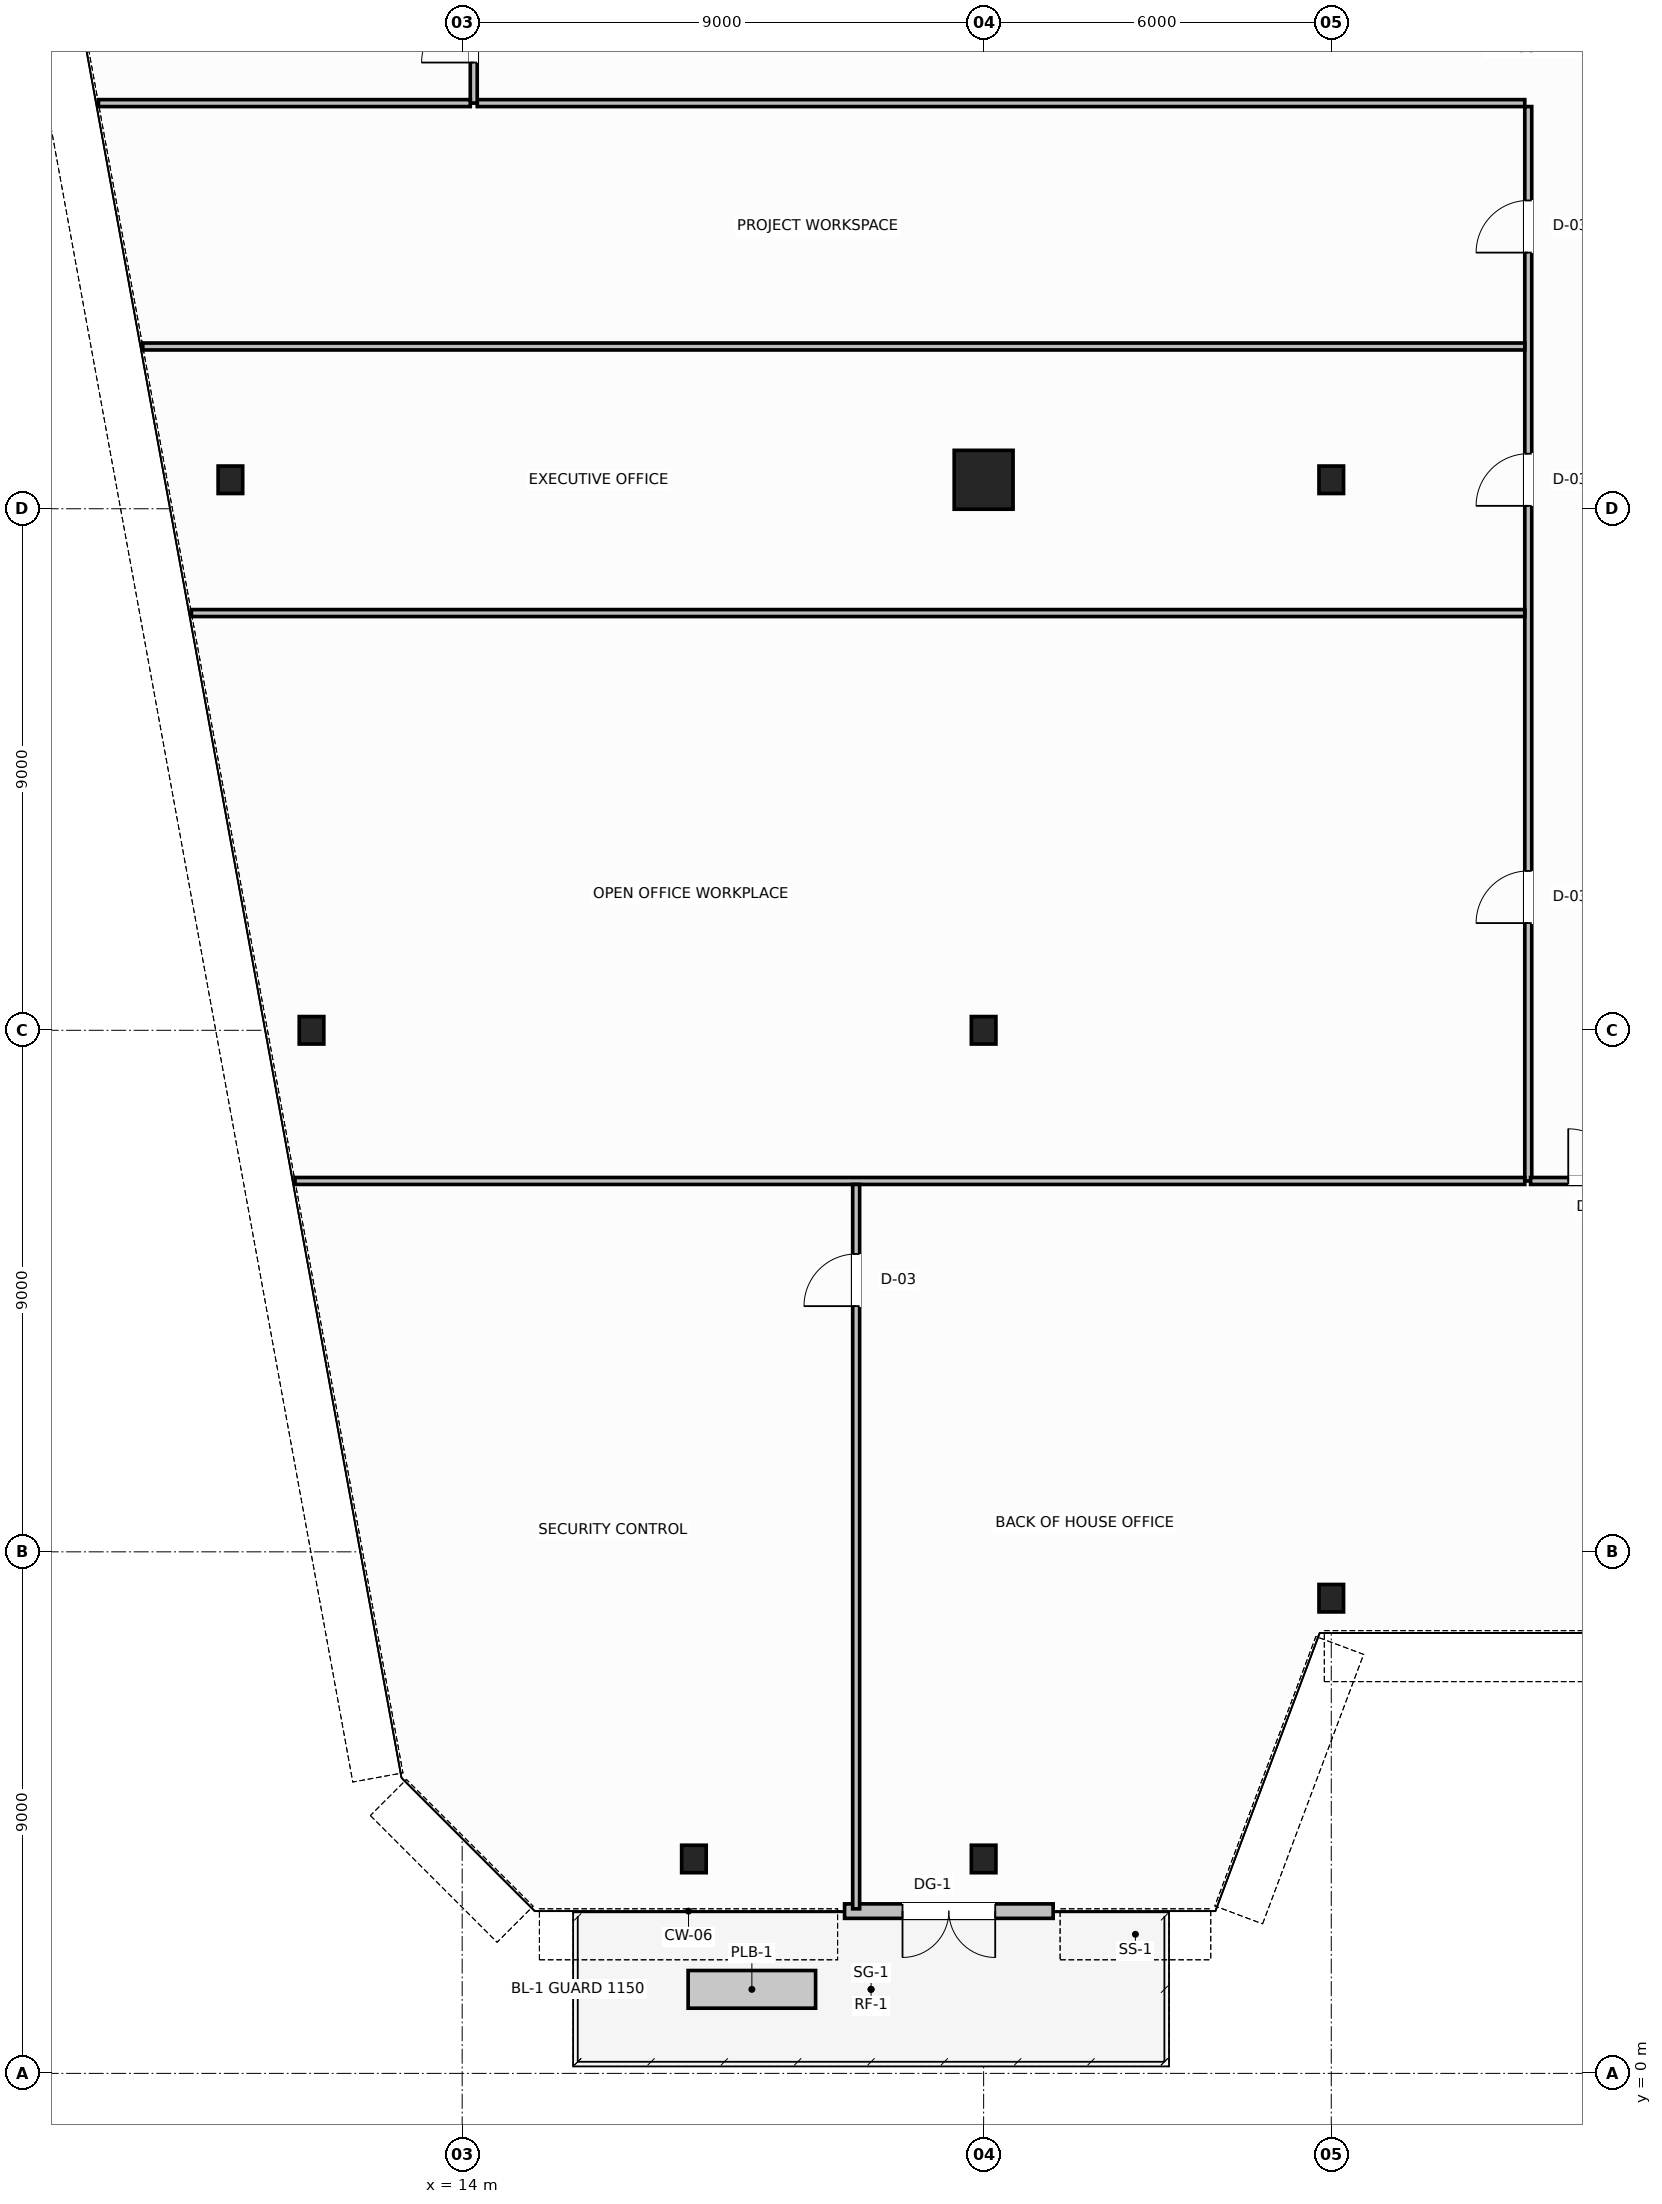
"""IFC4 building model, lengths in metres.
Left out: names, types, materials, properties, quantities, classifications, styles, units other than length and angle.
Written with IfcOpenShell. Run it as: python <this file> out.ifc"""

import sys

from ifc_helpers import new_model, si_unit, direction, frame, frame_2d, origin, origin_2d, place, context, subcontext, project, spatial, rectangle, hollow_circle, i_section, extrude, source, transform, mapped, element, fill, save


model = new_model("IFC4")
c1 = context("Model", 3, precision=1e-05, world=origin(), true_north=direction((0.0, 1.0)))
c2 = subcontext(c1, "Body", "Model", "MODEL_VIEW")
j1 = project(units=[si_unit("LENGTHUNIT", "METRE"), si_unit("PLANEANGLEUNIT", "RADIAN")], contexts=[c1])
p1 = place(None, origin())
s1 = spatial("IfcSite", under=j1, at=p1, CompositionType="ELEMENT")
p2 = place(p1, origin())
s2 = spatial("IfcBuilding", under=s1, at=p2, CompositionType="ELEMENT")
p3 = place(p2, frame((0.0, 0.0, 153.8)))
s3 = spatial("IfcBuildingStorey", under=s2, at=p3, CompositionType="ELEMENT", Elevation=153.8)
m1 = source(origin(), c2, "Body", "SweptSolid", [
    extrude(i_section(OverallWidth=0.424, OverallDepth=0.474, WebThickness=0.047, FlangeThickness=0.065, FilletRadius=0.015, at=origin_2d()), origin(), (0.0, 0.0, 1.0), 3.8),
])
for number, where, z_axis, x_axis in (
    (1, (10.0, 27.5, 0.0), (0.0, 0.0, 1.0), (1.0, 0.0, 0.0)),
    (2, (11.4, 18.0, 0.0), (0.0, 0.0, 1.0), (1.0, 0.0, 0.0)),
):
    element("IfcColumn", number, at=place(p3, frame(where, z_axis=z_axis, x_axis=x_axis)), inside=s3, PredefinedType="COLUMN", context=c2, shape_type="MappedRepresentation", body=[
        mapped(m1, transform((0.0, 0.0, 0.0), scale=1.0)),
    ])
m2 = source(origin(), c2, "Body", "SweptSolid", [
    extrude(hollow_circle(Radius=0.508, WallThickness=0.045, at=origin_2d()), origin(), (0.0, 0.0, 1.0), 3.8),
])
p4 = place(p3, frame((23.0, 27.5, 0.0), z_axis=(0.0, 0.0, 1.0), x_axis=(1.0, 0.0, 0.0)))
e3 = element("IfcColumn", 3, at=p4, inside=s3, PredefinedType="COLUMN", context=c2, shape_type="MappedRepresentation", body=[
    mapped(m2, transform((0.0, 0.0, 0.0), scale=1.0)),
])
m3 = source(origin(), c2, "Body", "SweptSolid", [
    extrude(i_section(OverallWidth=0.424, OverallDepth=0.474, WebThickness=0.047, FlangeThickness=0.065, FilletRadius=0.015, at=origin_2d()), origin(), (0.0, 0.0, 1.0), 3.8),
])
for number, where, z_axis, x_axis in (
    (4, (29.0, 27.5, 0.0), (0.0, 0.0, 1.0), (1.0, 0.0, 0.0)),
    (5, (23.0, 18.0, 0.0), (0.0, 0.0, 1.0), (1.0, 0.0, 0.0)),
):
    element("IfcColumn", number, at=place(p3, frame(where, z_axis=z_axis, x_axis=x_axis)), inside=s3, PredefinedType="COLUMN", context=c2, shape_type="MappedRepresentation", body=[
        mapped(m3, transform((0.0, 0.0, 0.0), scale=1.0)),
    ])
m4 = source(origin(), c2, "Body", "SweptSolid", [
    extrude(i_section(OverallWidth=0.424, OverallDepth=0.474, WebThickness=0.047, FlangeThickness=0.065, FilletRadius=0.015, at=origin_2d()), origin(), (0.0, 0.0, 1.0), 4.06),
])
for number, where, z_axis, x_axis in (
    (6, (18.0, 3.7, -0.26), (0.0, 0.0, 1.0), (1.0, 0.0, 0.0)),
    (7, (23.0, 3.7, -0.26), (0.0, 0.0, 1.0), (1.0, 0.0, 0.0)),
    (8, (29.0, 8.2, -0.26), (0.0, 0.0, 1.0), (1.0, 0.0, 0.0)),
):
    element("IfcColumn", number, at=place(p3, frame(where, z_axis=z_axis, x_axis=x_axis)), inside=s3, PredefinedType="COLUMN", context=c2, shape_type="MappedRepresentation", body=[
        mapped(m4, transform((0.0, 0.0, 0.0), scale=1.0)),
    ])
p5 = place(p3, frame((24.2, 2.8, 0.0), z_axis=(0.0, 0.0, 1.0), x_axis=(-1.0, 0.0, 0.0)))
e9 = element("IfcWall", 9, at=p5, inside=s3, PredefinedType="STANDARD", context=c2, shape_type="SweptSolid", body=[
    extrude(rectangle(XDim=3.6, YDim=0.25, at=frame_2d((1.8, 0.0))), origin(), (0.0, 0.0, 1.0), 3.58),
])
p6 = place(p5, frame((1.0, 0.0, 0.0)))
e10 = element("IfcOpeningElement", 10, at=p6, cuts=e9, PredefinedType="OPENING", context=c2, shape_type="SweptSolid", body=[
    extrude(rectangle(XDim=1.6, YDim=2.3, at=frame_2d((0.8, 1.15))), frame((0.0, 0.135, 0.0), z_axis=(0.0, -1.0, 0.0), x_axis=(1.0, 0.0, 0.0)), (0.0, 0.0, 1.0), 0.27),
])
p7 = place(p3, frame((17.9, 1.45, 0.0), z_axis=(0.0, 0.0, 1.0), x_axis=(1.0, 0.0, 0.0)))
e11 = element("IfcWall", 11, at=p7, inside=s3, PredefinedType="PARAPET", context=c2, shape_type="SweptSolid", body=[
    extrude(rectangle(XDim=2.2, YDim=0.65, at=frame_2d((1.1, 0.0))), origin(), (0.0, 0.0, 1.0), 0.65),
])
p8 = place(p3, frame((14.26, 34.0, 0.0), z_axis=(0.0, 0.0, 1.0), x_axis=(1.0, 0.0, 0.0)))
e12 = element("IfcWall", 12, at=p8, inside=s3, PredefinedType="PARTITIONING", context=c2, shape_type="SweptSolid", body=[
    extrude(rectangle(XDim=18.08, YDim=0.12, at=frame_2d((9.04, 0.0))), origin(), (0.0, 0.0, 1.0), 3.58),
])
p9 = place(p3, frame((14.2, 34.0, 0.0), z_axis=(0.0, 0.0, 1.0), x_axis=(0.0, 1.0, 0.0)))
e13 = element("IfcWall", 13, at=p9, inside=s3, PredefinedType="PARTITIONING", context=c2, shape_type="SweptSolid", body=[
    extrude(rectangle(XDim=2.44, YDim=0.12, at=frame_2d((1.22, 0.0))), origin(), (0.0, 0.0, 1.0), 3.58),
])
p10 = place(p9, frame((0.7, 0.0, 0.0)))
e14 = element("IfcOpeningElement", 14, at=p10, cuts=e13, PredefinedType="OPENING", context=c2, shape_type="SweptSolid", body=[
    extrude(rectangle(XDim=0.9, YDim=2.15, at=frame_2d((0.45, 1.075))), frame((0.0, 0.07, 0.0), z_axis=(0.0, -1.0, 0.0), x_axis=(1.0, 0.0, 0.0)), (0.0, 0.0, 1.0), 0.14),
])
p11 = place(p3, frame((32.4, 15.4, 0.0), z_axis=(0.0, 0.0, 1.0), x_axis=(0.0, 1.0, 0.0)))
e15 = element("IfcWall", 15, at=p11, inside=s3, PredefinedType="PARTITIONING", context=c2, shape_type="SweptSolid", body=[
    extrude(rectangle(XDim=18.54, YDim=0.12, at=frame_2d((9.27, 0.0))), origin(), (0.0, 0.0, 1.0), 3.58),
])
p12 = place(p11, frame((4.45, 0.0, 0.0)))
e16 = element("IfcOpeningElement", 16, at=p12, cuts=e15, PredefinedType="OPENING", context=c2, shape_type="SweptSolid", body=[
    extrude(rectangle(XDim=0.9, YDim=2.15, at=frame_2d((0.45, 1.075))), frame((0.0, 0.07, 0.0), z_axis=(0.0, -1.0, 0.0), x_axis=(1.0, 0.0, 0.0)), (0.0, 0.0, 1.0), 0.14),
])
p13 = place(p11, frame((11.65, 0.0, 0.0)))
e17 = element("IfcOpeningElement", 17, at=p13, cuts=e15, PredefinedType="OPENING", context=c2, shape_type="SweptSolid", body=[
    extrude(rectangle(XDim=0.9, YDim=2.15, at=frame_2d((0.45, 1.075))), frame((0.0, 0.07, 0.0), z_axis=(0.0, -1.0, 0.0), x_axis=(1.0, 0.0, 0.0)), (0.0, 0.0, 1.0), 0.14),
])
p14 = place(p11, frame((16.02, 0.0, 0.0)))
e18 = element("IfcOpeningElement", 18, at=p14, cuts=e15, PredefinedType="OPENING", context=c2, shape_type="SweptSolid", body=[
    extrude(rectangle(XDim=0.9, YDim=2.15, at=frame_2d((0.45, 1.075))), frame((0.0, 0.07, 0.0), z_axis=(0.0, -1.0, 0.0), x_axis=(1.0, 0.0, 0.0)), (0.0, 0.0, 1.0), 0.14),
])
p15 = place(p3, frame((32.44, 15.4, 0.0), z_axis=(0.0, 0.0, 1.0), x_axis=(1.0, 0.0, 0.0)))
e19 = element("IfcWall", 19, at=p15, inside=s3, PredefinedType="PARTITIONING", context=c2, shape_type="SweptSolid", body=[
    extrude(rectangle(XDim=2.32, YDim=0.12, at=frame_2d((1.16, 0.0))), origin(), (0.0, 0.0, 1.0), 3.58),
])
p16 = place(p15, frame((0.65, 0.0, 0.0)))
e20 = element("IfcOpeningElement", 20, at=p16, cuts=e19, PredefinedType="OPENING", context=c2, shape_type="SweptSolid", body=[
    extrude(rectangle(XDim=0.9, YDim=2.15, at=frame_2d((0.45, 1.075))), frame((0.0, 0.07, 0.0), z_axis=(0.0, -1.0, 0.0), x_axis=(1.0, 0.0, 0.0)), (0.0, 0.0, 1.0), 0.14),
])
p17 = place(p3, frame((7.721, 34.0, 0.0), z_axis=(0.0, 0.0, 1.0), x_axis=(1.0, 0.0, 0.0)))
e21 = element("IfcWall", 21, at=p17, inside=s3, PredefinedType="PARTITIONING", context=c2, shape_type="SweptSolid", body=[
    extrude(rectangle(XDim=6.418, YDim=0.12, at=frame_2d((3.209, 0.0))), origin(), (0.0, 0.0, 1.0), 3.58),
])
p18 = place(p3, frame((9.327, 25.2, 0.0), z_axis=(0.0, 0.0, 1.0), x_axis=(1.0, 0.0, 0.0)))
e22 = element("IfcWall", 22, at=p18, inside=s3, PredefinedType="PARTITIONING", context=c2, shape_type="SweptSolid", body=[
    extrude(rectangle(XDim=23.013, YDim=0.12, at=frame_2d((11.507, 0.0))), origin(), (0.0, 0.0, 1.0), 3.58),
])
p19 = place(p3, frame((8.488, 29.8, 0.0), z_axis=(0.0, 0.0, 1.0), x_axis=(1.0, 0.0, 0.0)))
e23 = element("IfcWall", 23, at=p19, inside=s3, PredefinedType="PARTITIONING", context=c2, shape_type="SweptSolid", body=[
    extrude(rectangle(XDim=23.853, YDim=0.12, at=frame_2d((11.926, 0.0))), origin(), (0.0, 0.0, 1.0), 3.58),
])
p20 = place(p3, frame((11.114, 15.4, 0.0), z_axis=(0.0, 0.0, 1.0), x_axis=(1.0, 0.0, 0.0)))
e24 = element("IfcWall", 24, at=p20, inside=s3, PredefinedType="PARTITIONING", context=c2, shape_type="SweptSolid", body=[
    extrude(rectangle(XDim=21.226, YDim=0.12, at=frame_2d((10.613, 0.0))), origin(), (0.0, 0.0, 1.0), 3.58),
])
p21 = place(p3, frame((20.8, 2.84, 0.0), z_axis=(0.0, 0.0, 1.0), x_axis=(0.0, 1.0, 0.0)))
e25 = element("IfcWall", 25, at=p21, inside=s3, PredefinedType="PARTITIONING", context=c2, shape_type="SweptSolid", body=[
    extrude(rectangle(XDim=12.5, YDim=0.12, at=frame_2d((6.25, 0.0))), origin(), (0.0, 0.0, 1.0), 3.58),
])
p22 = place(p21, frame((10.4, 0.0, 0.0)))
e26 = element("IfcOpeningElement", 26, at=p22, cuts=e25, PredefinedType="OPENING", context=c2, shape_type="SweptSolid", body=[
    extrude(rectangle(XDim=0.9, YDim=2.15, at=frame_2d((0.45, 1.075))), frame((0.0, 0.07, 0.0), z_axis=(0.0, -1.0, 0.0), x_axis=(1.0, 0.0, 0.0)), (0.0, 0.0, 1.0), 0.14),
])
m5 = source(origin(), c2, "Body", "SweptSolid", [
    extrude(rectangle(XDim=1.6, YDim=2.3, at=frame_2d((0.8, 1.15))), frame((0.0, 0.025, 0.0), z_axis=(0.0, -1.0, 0.0), x_axis=(1.0, 0.0, 0.0)), (0.0, 0.0, 1.0), 0.05),
])
p23 = place(p6, origin())
e27 = element("IfcDoor", 27, at=p23, inside=s3, OperationType="DOUBLE_DOOR_SINGLE_SWING", PredefinedType="DOOR", context=c2, shape_type="MappedRepresentation", body=[
    mapped(m5, transform((0.0, 0.0, 0.0), scale=1.0)),
])
fill(e10, e27)
m6 = source(origin(), c2, "Body", "SweptSolid", [
    extrude(rectangle(XDim=0.9, YDim=2.15, at=frame_2d((0.45, 1.075))), frame((0.0, 0.025, 0.0), z_axis=(0.0, -1.0, 0.0), x_axis=(1.0, 0.0, 0.0)), (0.0, 0.0, 1.0), 0.05),
])
p24 = place(p10, origin())
e28 = element("IfcDoor", 28, at=p24, inside=s3, OperationType="SINGLE_SWING_LEFT", PredefinedType="DOOR", context=c2, shape_type="MappedRepresentation", body=[
    mapped(m6, transform((0.0, 0.0, 0.0), scale=1.0)),
])
fill(e14, e28)
p25 = place(p12, origin())
e29 = element("IfcDoor", 29, at=p25, inside=s3, OperationType="SINGLE_SWING_LEFT", PredefinedType="DOOR", context=c2, shape_type="MappedRepresentation", body=[
    mapped(m6, transform((0.0, 0.0, 0.0), scale=1.0)),
])
fill(e16, e29)
p26 = place(p13, origin())
e30 = element("IfcDoor", 30, at=p26, inside=s3, OperationType="SINGLE_SWING_RIGHT", PredefinedType="DOOR", context=c2, shape_type="MappedRepresentation", body=[
    mapped(m6, transform((0.0, 0.0, 0.0), scale=1.0)),
])
fill(e17, e30)
p27 = place(p14, origin())
e31 = element("IfcDoor", 31, at=p27, inside=s3, OperationType="SINGLE_SWING_LEFT", PredefinedType="DOOR", context=c2, shape_type="MappedRepresentation", body=[
    mapped(m6, transform((0.0, 0.0, 0.0), scale=1.0)),
])
fill(e18, e31)
p28 = place(p22, origin())
e32 = element("IfcDoor", 32, at=p28, inside=s3, OperationType="SINGLE_SWING_RIGHT", PredefinedType="DOOR", context=c2, shape_type="MappedRepresentation", body=[
    mapped(m6, transform((0.0, 0.0, 0.0), scale=1.0)),
])
fill(e26, e32)
p29 = place(p16, origin())
e33 = element("IfcDoor", 33, at=p29, inside=s3, OperationType="SINGLE_SWING_LEFT", PredefinedType="DOOR", context=c2, shape_type="MappedRepresentation", body=[
    mapped(m6, transform((0.0, 0.0, 0.0), scale=1.0)),
])
fill(e20, e33)
save(model, sys.argv[1])
